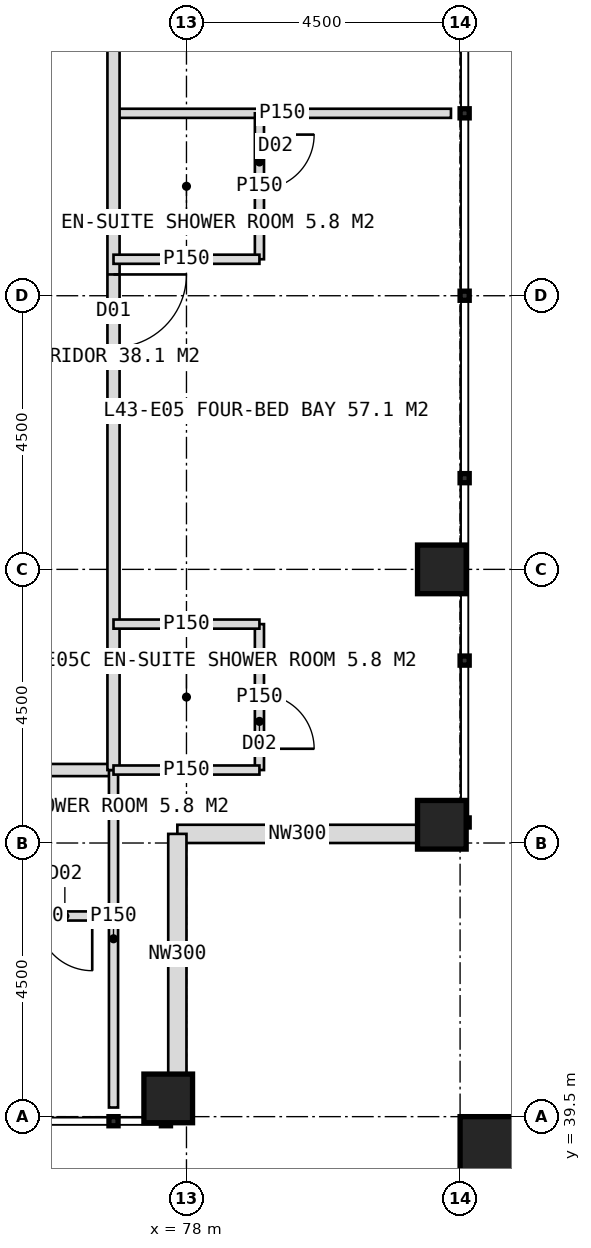
"""IFC4 building model, lengths in metres.
Left out: names, types, materials, properties, quantities, classifications, styles, units other than length and angle.
Written with IfcOpenShell. Run it as: python <this file> out.ifc"""

import sys

from ifc_helpers import new_model, si_unit, direction, frame, frame_2d, origin, origin_2d, place, context, subcontext, project, spatial, rectangle, hollow_rectangle, extrude, element, fill, save


model = new_model("IFC4")
c1 = context("Model", 3, precision=1e-05, world=origin(), true_north=direction((0.0, 1.0)))
c2 = subcontext(c1, "Body", "Model", "MODEL_VIEW")
j1 = project(units=[si_unit("LENGTHUNIT", "METRE"), si_unit("PLANEANGLEUNIT", "RADIAN")], contexts=[c1])
p1 = place(None, origin())
s1 = spatial("IfcSite", under=j1, at=p1, CompositionType="ELEMENT")
p2 = place(p1, origin())
s2 = spatial("IfcBuilding", under=s1, at=p2, CompositionType="ELEMENT")
p3 = place(p2, frame((0.0, 0.0, 181.0)))
s3 = spatial("IfcBuildingStorey", under=s2, at=p3, CompositionType="ELEMENT", Elevation=181.0)
for number, where, z_axis, x_axis in (
    (1, (82.2, 44.3, 0.0), (0.0, 0.0, 1.0), (1.0, 0.0, 0.0)),
    (2, (82.2, 48.5, 0.0), (0.0, 0.0, 1.0), (1.0, 0.0, 0.0)),
    (3, (77.7, 39.8, 0.0), (0.0, 0.0, 1.0), (1.0, 0.0, 0.0)),
):
    element("IfcColumn", number, at=place(p3, frame(where, z_axis=z_axis, x_axis=x_axis)), inside=s3, PredefinedType="COLUMN", context=c2, shape_type="SweptSolid", body=[
        extrude(hollow_rectangle(XDim=0.8, YDim=0.8, WallThickness=0.08, at=origin_2d()), origin(), (0.0, 0.0, 1.0), 4.0),
    ])
p4 = place(p3, frame((83.1, 38.9, 0.0), z_axis=(0.0, 0.0, 1.0), x_axis=(1.0, 0.0, 0.0)))
e4 = element("IfcColumn", 4, at=p4, inside=s3, PredefinedType="COLUMN", context=c2, shape_type="SweptSolid", body=[
    extrude(hollow_rectangle(XDim=1.2, YDim=1.2, WallThickness=0.07, at=origin_2d()), origin(), (0.0, 0.0, 1.0), 4.0),
])
for number, where, z_axis, x_axis in (
    (5, (81.8, 44.15, 0.0), (0.0, 0.0, 1.0), (-1.0, 0.0, 0.0)),
    (6, (77.85, 44.15, 0.0), (0.0, 0.0, 1.0), (0.0, -1.0, 0.0)),
):
    element("IfcWall", number, at=place(p3, frame(where, z_axis=z_axis, x_axis=x_axis)), inside=s3, PredefinedType="ELEMENTEDWALL", context=c2, shape_type="SweptSolid", body=[
        extrude(rectangle(XDim=3.95, YDim=0.3, at=frame_2d((1.975, 0.0))), origin(), (0.0, 0.0, 1.0), 2.85),
    ])
p5 = place(p3, frame((76.8, 45.2, 0.0), z_axis=(0.0, 0.0, 1.0), x_axis=(-1.0, 0.0, 0.0)))
e7 = element("IfcWall", 7, at=p5, inside=s3, PredefinedType="PARTITIONING", context=c2, shape_type="SweptSolid", body=[
    extrude(rectangle(XDim=33.6, YDim=0.2, at=frame_2d((16.8, 0.0))), origin(), (0.0, 0.0, 1.0), 3.75),
])
p6 = place(p5, frame((2.65, 0.0, 0.0)))
e8 = element("IfcOpeningElement", 8, at=p6, cuts=e7, PredefinedType="OPENING", context=c2, shape_type="SweptSolid", body=[
    extrude(rectangle(XDim=1.2, YDim=2.2, at=frame_2d((0.6, 1.1))), frame((0.0, 0.11, 0.0), z_axis=(0.0, -1.0, 0.0), x_axis=(1.0, 0.0, 0.0)), (0.0, 0.0, 1.0), 0.22),
])
p7 = place(p5, frame((14.05, 0.0, 0.0)))
e9 = element("IfcOpeningElement", 9, at=p7, cuts=e7, PredefinedType="OPENING", context=c2, shape_type="SweptSolid", body=[
    extrude(rectangle(XDim=1.2, YDim=2.2, at=frame_2d((0.6, 1.1))), frame((0.0, 0.11, 0.0), z_axis=(0.0, -1.0, 0.0), x_axis=(1.0, 0.0, 0.0)), (0.0, 0.0, 1.0), 0.22),
])
p8 = place(p5, frame((22.45, 0.0, 0.0)))
e10 = element("IfcOpeningElement", 10, at=p8, cuts=e7, PredefinedType="OPENING", context=c2, shape_type="SweptSolid", body=[
    extrude(rectangle(XDim=1.2, YDim=2.2, at=frame_2d((0.6, 1.1))), frame((0.0, 0.11, 0.0), z_axis=(0.0, -1.0, 0.0), x_axis=(1.0, 0.0, 0.0)), (0.0, 0.0, 1.0), 0.22),
])
p9 = place(p3, frame((76.8, 45.2, 0.0), z_axis=(0.0, 0.0, 1.0), x_axis=(0.0, -1.0, 0.0)))
e11 = element("IfcWall", 11, at=p9, inside=s3, PredefinedType="PARTITIONING", context=c2, shape_type="SweptSolid", body=[
    extrude(rectangle(XDim=5.55, YDim=0.15, at=frame_2d((2.775, 0.0))), origin(), (0.0, 0.0, 1.0), 3.75),
])
p10 = place(p3, frame((76.8, 42.8, 0.0), z_axis=(0.0, 0.0, 1.0), x_axis=(-1.0, 0.0, 0.0)))
e12 = element("IfcWall", 12, at=p10, inside=s3, PredefinedType="PARTITIONING", context=c2, shape_type="SweptSolid", body=[
    extrude(rectangle(XDim=2.4, YDim=0.15, at=frame_2d((1.2, 0.0))), origin(), (0.0, 0.0, 1.0), 3.75),
])
p11 = place(p10, frame((0.35, 0.0, 0.0)))
e13 = element("IfcOpeningElement", 13, at=p11, cuts=e12, PredefinedType="OPENING", context=c2, shape_type="SweptSolid", body=[
    extrude(rectangle(XDim=0.9, YDim=2.1, at=frame_2d((0.45, 1.05))), frame((0.0, 0.085, 0.0), z_axis=(0.0, -1.0, 0.0), x_axis=(1.0, 0.0, 0.0)), (0.0, 0.0, 1.0), 0.17),
])
p12 = place(p3, frame((76.8, 56.0, 0.0), z_axis=(0.0, 0.0, 1.0), x_axis=(1.0, 0.0, 0.0)))
e14 = element("IfcWall", 14, at=p12, inside=s3, PredefinedType="PARTITIONING", context=c2, shape_type="SweptSolid", body=[
    extrude(rectangle(XDim=5.55, YDim=0.15, at=frame_2d((2.775, 0.0))), origin(), (0.0, 0.0, 1.0), 3.75),
])
p13 = place(p3, frame((76.8, 78.8, 0.0), z_axis=(0.0, 0.0, 1.0), x_axis=(0.0, -1.0, 0.0)))
e15 = element("IfcWall", 15, at=p13, inside=s3, PredefinedType="PARTITIONING", context=c2, shape_type="SweptSolid", body=[
    extrude(rectangle(XDim=33.6, YDim=0.2, at=frame_2d((16.8, 0.0))), origin(), (0.0, 0.0, 1.0), 3.75),
])
p14 = place(p13, frame((2.65, 0.0, 0.0)))
e16 = element("IfcOpeningElement", 16, at=p14, cuts=e15, PredefinedType="OPENING", context=c2, shape_type="SweptSolid", body=[
    extrude(rectangle(XDim=1.2, YDim=2.2, at=frame_2d((0.6, 1.1))), frame((0.0, 0.11, 0.0), z_axis=(0.0, -1.0, 0.0), x_axis=(1.0, 0.0, 0.0)), (0.0, 0.0, 1.0), 0.22),
])
p15 = place(p13, frame((7.45, 0.0, 0.0)))
e17 = element("IfcOpeningElement", 17, at=p15, cuts=e15, PredefinedType="OPENING", context=c2, shape_type="SweptSolid", body=[
    extrude(rectangle(XDim=1.2, YDim=2.2, at=frame_2d((0.6, 1.1))), frame((0.0, 0.11, 0.0), z_axis=(0.0, -1.0, 0.0), x_axis=(1.0, 0.0, 0.0)), (0.0, 0.0, 1.0), 0.22),
])
p16 = place(p13, frame((13.45, 0.0, 0.0)))
e18 = element("IfcOpeningElement", 18, at=p16, cuts=e15, PredefinedType="OPENING", context=c2, shape_type="SweptSolid", body=[
    extrude(rectangle(XDim=1.2, YDim=2.2, at=frame_2d((0.6, 1.1))), frame((0.0, 0.11, 0.0), z_axis=(0.0, -1.0, 0.0), x_axis=(1.0, 0.0, 0.0)), (0.0, 0.0, 1.0), 0.22),
])
p17 = place(p13, frame((19.45, 0.0, 0.0)))
e19 = element("IfcOpeningElement", 19, at=p17, cuts=e15, PredefinedType="OPENING", context=c2, shape_type="SweptSolid", body=[
    extrude(rectangle(XDim=1.2, YDim=2.2, at=frame_2d((0.6, 1.1))), frame((0.0, 0.11, 0.0), z_axis=(0.0, -1.0, 0.0), x_axis=(1.0, 0.0, 0.0)), (0.0, 0.0, 1.0), 0.22),
])
p18 = place(p13, frame((25.45, 0.0, 0.0)))
e20 = element("IfcOpeningElement", 20, at=p18, cuts=e15, PredefinedType="OPENING", context=c2, shape_type="SweptSolid", body=[
    extrude(rectangle(XDim=1.2, YDim=2.2, at=frame_2d((0.6, 1.1))), frame((0.0, 0.11, 0.0), z_axis=(0.0, -1.0, 0.0), x_axis=(1.0, 0.0, 0.0)), (0.0, 0.0, 1.0), 0.22),
])
p19 = place(p3, frame((79.2, 56.0, 0.0), z_axis=(0.0, 0.0, 1.0), x_axis=(0.0, -1.0, 0.0)))
e21 = element("IfcWall", 21, at=p19, inside=s3, PredefinedType="PARTITIONING", context=c2, shape_type="SweptSolid", body=[
    extrude(rectangle(XDim=2.4, YDim=0.15, at=frame_2d((1.2, 0.0))), origin(), (0.0, 0.0, 1.0), 3.75),
])
p20 = place(p19, frame((0.35, 0.0, 0.0)))
e22 = element("IfcOpeningElement", 22, at=p20, cuts=e21, PredefinedType="OPENING", context=c2, shape_type="SweptSolid", body=[
    extrude(rectangle(XDim=0.9, YDim=2.1, at=frame_2d((0.45, 1.05))), frame((0.0, 0.085, 0.0), z_axis=(0.0, -1.0, 0.0), x_axis=(1.0, 0.0, 0.0)), (0.0, 0.0, 1.0), 0.17),
])
p21 = place(p3, frame((76.8, 53.6, 0.0), z_axis=(0.0, 0.0, 1.0), x_axis=(1.0, 0.0, 0.0)))
e23 = element("IfcWall", 23, at=p21, inside=s3, PredefinedType="PARTITIONING", context=c2, shape_type="SweptSolid", body=[
    extrude(rectangle(XDim=2.4, YDim=0.15, at=frame_2d((1.2, 0.0))), origin(), (0.0, 0.0, 1.0), 3.75),
])
p22 = place(p3, frame((79.2, 47.6, 0.0), z_axis=(0.0, 0.0, 1.0), x_axis=(0.0, -1.0, 0.0)))
e24 = element("IfcWall", 24, at=p22, inside=s3, PredefinedType="PARTITIONING", context=c2, shape_type="SweptSolid", body=[
    extrude(rectangle(XDim=2.4, YDim=0.15, at=frame_2d((1.2, 0.0))), origin(), (0.0, 0.0, 1.0), 3.75),
])
p23 = place(p22, frame((1.15, 0.0, 0.0)))
e25 = element("IfcOpeningElement", 25, at=p23, cuts=e24, PredefinedType="OPENING", context=c2, shape_type="SweptSolid", body=[
    extrude(rectangle(XDim=0.9, YDim=2.1, at=frame_2d((0.45, 1.05))), frame((0.0, 0.085, 0.0), z_axis=(0.0, -1.0, 0.0), x_axis=(1.0, 0.0, 0.0)), (0.0, 0.0, 1.0), 0.17),
])
for number, where, z_axis, x_axis in (
    (26, (76.8, 47.6, 0.0), (0.0, 0.0, 1.0), (1.0, 0.0, 0.0)),
    (27, (76.8, 45.2, 0.0), (0.0, 0.0, 1.0), (1.0, 0.0, 0.0)),
):
    element("IfcWall", number, at=place(p3, frame(where, z_axis=z_axis, x_axis=x_axis)), inside=s3, PredefinedType="PARTITIONING", context=c2, shape_type="SweptSolid", body=[
        extrude(rectangle(XDim=2.4, YDim=0.15, at=frame_2d((1.2, 0.0))), origin(), (0.0, 0.0, 1.0), 3.75),
    ])
p24 = place(p11, origin())
e28 = element("IfcDoor", 28, at=p24, inside=s3, OperationType="SINGLE_SWING_LEFT", PredefinedType="DOOR", context=c2, shape_type="SweptSolid", body=[
    extrude(rectangle(XDim=0.9, YDim=2.1, at=frame_2d((0.45, 1.05))), frame((0.0, 0.025, 0.0), z_axis=(0.0, -1.0, 0.0), x_axis=(1.0, 0.0, 0.0)), (0.0, 0.0, 1.0), 0.05),
])
fill(e13, e28)
p25 = place(p18, origin())
e29 = element("IfcDoor", 29, at=p25, inside=s3, OperationType="SINGLE_SWING_LEFT", PredefinedType="DOOR", context=c2, shape_type="SweptSolid", body=[
    extrude(rectangle(XDim=1.2, YDim=2.2, at=frame_2d((0.6, 1.1))), frame((0.0, 0.025, 0.0), z_axis=(0.0, -1.0, 0.0), x_axis=(1.0, 0.0, 0.0)), (0.0, 0.0, 1.0), 0.05),
])
fill(e20, e29)
p26 = place(p20, origin())
e30 = element("IfcDoor", 30, at=p26, inside=s3, OperationType="SINGLE_SWING_LEFT", PredefinedType="DOOR", context=c2, shape_type="SweptSolid", body=[
    extrude(rectangle(XDim=0.9, YDim=2.1, at=frame_2d((0.45, 1.05))), frame((0.0, 0.025, 0.0), z_axis=(0.0, -1.0, 0.0), x_axis=(1.0, 0.0, 0.0)), (0.0, 0.0, 1.0), 0.05),
])
fill(e22, e30)
p27 = place(p23, origin())
e31 = element("IfcDoor", 31, at=p27, inside=s3, OperationType="SINGLE_SWING_RIGHT", PredefinedType="DOOR", context=c2, shape_type="SweptSolid", body=[
    extrude(rectangle(XDim=0.9, YDim=2.1, at=frame_2d((0.45, 1.05))), frame((0.0, 0.025, 0.0), z_axis=(0.0, -1.0, 0.0), x_axis=(1.0, 0.0, 0.0)), (0.0, 0.0, 1.0), 0.05),
])
fill(e25, e31)
save(model, sys.argv[1])
